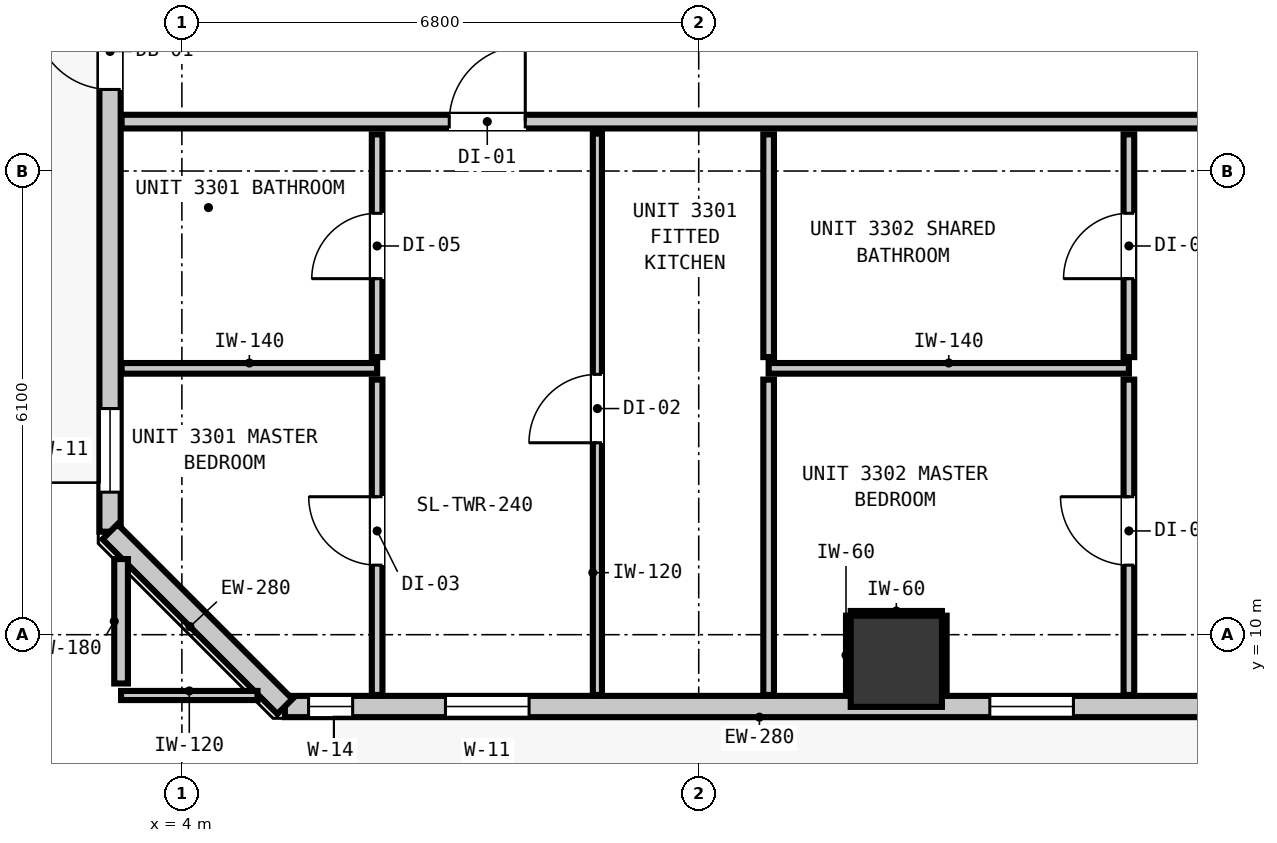
"""IFC4 building model, lengths in metres.
Left out: names, types, materials, properties, quantities, classifications, styles, units other than length and angle.
Written with IfcOpenShell. Run it as: python <this file> out.ifc"""

import sys

from ifc_helpers import new_model, si_unit, direction, frame, frame_2d, origin, origin_2d, place, context, subcontext, project, spatial, rectangle, extrude, element, fill, save


model = new_model("IFC4")
c1 = context("Model", 3, precision=1e-05, world=origin(), true_north=direction((0.0, 1.0)))
c2 = subcontext(c1, "Body", "Model", "MODEL_VIEW")
j1 = project(units=[si_unit("LENGTHUNIT", "METRE"), si_unit("PLANEANGLEUNIT", "RADIAN")], contexts=[c1])
p1 = place(None, origin())
s1 = spatial("IfcSite", under=j1, at=p1, CompositionType="ELEMENT")
p2 = place(p1, origin())
s2 = spatial("IfcBuilding", under=s1, at=p2, CompositionType="ELEMENT")
p3 = place(p2, frame((0.0, 0.0, 116.04)))
s3 = spatial("IfcBuildingStorey", under=s2, at=p3, CompositionType="ELEMENT", Elevation=116.04)
p4 = place(p3, frame((13.4, 9.65, 0.0), z_axis=(0.0, 0.0, 1.0), x_axis=(1.0, 0.0, 0.0)))
e1 = element("IfcColumn", 1, at=p4, inside=s3, PredefinedType="COLUMN", context=c2, shape_type="SweptSolid", body=[
    extrude(rectangle(XDim=1.2, YDim=1.2, at=origin_2d()), origin(), (0.0, 0.0, 1.0), 3.32),
])
p5 = place(p3, frame((3.055, 11.355, 0.0), z_axis=(0.0, 0.0, 1.0), x_axis=(0.0, 1.0, 0.0)))
e2 = element("IfcWall", 2, at=p5, inside=s3, PredefinedType="STANDARD", context=c2, shape_type="SweptSolid", body=[
    extrude(rectangle(XDim=32.29, YDim=0.28, at=frame_2d((16.145, 0.0))), origin(), (0.0, 0.0, 1.0), 3.08),
])
p6 = place(p5, frame((5.818, 0.0, 0.0)))
e3 = element("IfcOpeningElement", 3, at=p6, cuts=e2, PredefinedType="OPENING", context=c2, shape_type="SweptSolid", body=[
    extrude(rectangle(XDim=1.0, YDim=2.15, at=frame_2d((0.5, 1.075))), frame((0.0, 0.15, 0.0), z_axis=(0.0, -1.0, 0.0), x_axis=(1.0, 0.0, 0.0)), (0.0, 0.0, 1.0), 0.3),
])
p7 = place(p5, frame((0.52, 0.0, 0.85)))
e4 = element("IfcOpeningElement", 4, at=p7, cuts=e2, PredefinedType="OPENING", context=c2, shape_type="SweptSolid", body=[
    extrude(rectangle(XDim=1.1, YDim=2.05, at=frame_2d((0.55, 1.025))), frame((0.0, 0.15, 0.0), z_axis=(0.0, -1.0, 0.0), x_axis=(1.0, 0.0, 0.0)), (0.0, 0.0, 1.0), 0.3),
])
p8 = place(p5, frame((20.905, 0.0, 0.85)))
e5 = element("IfcOpeningElement", 5, at=p8, cuts=e2, PredefinedType="OPENING", context=c2, shape_type="SweptSolid", body=[
    extrude(rectangle(XDim=1.1, YDim=2.05, at=frame_2d((0.55, 1.025))), frame((0.0, 0.15, 0.0), z_axis=(0.0, -1.0, 0.0), x_axis=(1.0, 0.0, 0.0)), (0.0, 0.0, 1.0), 0.3),
])
p9 = place(p5, frame((12.735, 0.0, 0.85)))
e6 = element("IfcOpeningElement", 6, at=p9, cuts=e2, PredefinedType="OPENING", context=c2, shape_type="SweptSolid", body=[
    extrude(rectangle(XDim=1.1, YDim=2.05, at=frame_2d((0.55, 1.025))), frame((0.0, 0.15, 0.0), z_axis=(0.0, -1.0, 0.0), x_axis=(1.0, 0.0, 0.0)), (0.0, 0.0, 1.0), 0.3),
])
p10 = place(p5, frame((24.855, 0.0, 0.85)))
e7 = element("IfcOpeningElement", 7, at=p10, cuts=e2, PredefinedType="OPENING", context=c2, shape_type="SweptSolid", body=[
    extrude(rectangle(XDim=1.1, YDim=2.05, at=frame_2d((0.55, 1.025))), frame((0.0, 0.15, 0.0), z_axis=(0.0, -1.0, 0.0), x_axis=(1.0, 0.0, 0.0)), (0.0, 0.0, 1.0), 0.3),
])
p11 = place(p3, frame((40.445, 9.055, 0.0), z_axis=(0.0, 0.0, 1.0), x_axis=(-1.0, 0.0, 0.0)))
e8 = element("IfcWall", 8, at=p11, inside=s3, PredefinedType="STANDARD", context=c2, shape_type="SweptSolid", body=[
    extrude(rectangle(XDim=35.09, YDim=0.28, at=frame_2d((17.545, 0.0))), origin(), (0.0, 0.0, 1.0), 3.08),
])
p12 = place(p11, frame((5.114, 0.0, 0.0)))
e9 = element("IfcOpeningElement", 9, at=p12, cuts=e8, PredefinedType="OPENING", context=c2, shape_type="SweptSolid", body=[
    extrude(rectangle(XDim=1.0, YDim=2.15, at=frame_2d((0.5, 1.075))), frame((0.0, 0.15, 0.0), z_axis=(0.0, -1.0, 0.0), x_axis=(1.0, 0.0, 0.0)), (0.0, 0.0, 1.0), 0.3),
])
p13 = place(p11, frame((31.877, 0.0, 0.85)))
e10 = element("IfcOpeningElement", 10, at=p13, cuts=e8, PredefinedType="OPENING", context=c2, shape_type="SweptSolid", body=[
    extrude(rectangle(XDim=1.1, YDim=2.05, at=frame_2d((0.55, 1.025))), frame((0.0, 0.15, 0.0), z_axis=(0.0, -1.0, 0.0), x_axis=(1.0, 0.0, 0.0)), (0.0, 0.0, 1.0), 0.3),
])
p14 = place(p11, frame((34.198, 0.0, 0.85)))
e11 = element("IfcOpeningElement", 11, at=p14, cuts=e8, PredefinedType="OPENING", context=c2, shape_type="SweptSolid", body=[
    extrude(rectangle(XDim=0.58, YDim=1.5, at=frame_2d((0.29, 0.75))), frame((0.0, 0.15, 0.0), z_axis=(0.0, -1.0, 0.0), x_axis=(1.0, 0.0, 0.0)), (0.0, 0.0, 1.0), 0.3),
])
p15 = place(p11, frame((21.515, 0.0, 0.85)))
e12 = element("IfcOpeningElement", 12, at=p15, cuts=e8, PredefinedType="OPENING", context=c2, shape_type="SweptSolid", body=[
    extrude(rectangle(XDim=1.1, YDim=2.05, at=frame_2d((0.55, 1.025))), frame((0.0, 0.15, 0.0), z_axis=(0.0, -1.0, 0.0), x_axis=(1.0, 0.0, 0.0)), (0.0, 0.0, 1.0), 0.3),
])
p16 = place(p11, frame((24.715, 0.0, 0.85)))
e13 = element("IfcOpeningElement", 13, at=p16, cuts=e8, PredefinedType="OPENING", context=c2, shape_type="SweptSolid", body=[
    extrude(rectangle(XDim=1.1, YDim=2.05, at=frame_2d((0.55, 1.025))), frame((0.0, 0.15, 0.0), z_axis=(0.0, -1.0, 0.0), x_axis=(1.0, 0.0, 0.0)), (0.0, 0.0, 1.0), 0.3),
])
p17 = place(p11, frame((14.824, 0.0, 0.85)))
e14 = element("IfcOpeningElement", 14, at=p17, cuts=e8, PredefinedType="OPENING", context=c2, shape_type="SweptSolid", body=[
    extrude(rectangle(XDim=1.1, YDim=2.05, at=frame_2d((0.55, 1.025))), frame((0.0, 0.15, 0.0), z_axis=(0.0, -1.0, 0.0), x_axis=(1.0, 0.0, 0.0)), (0.0, 0.0, 1.0), 0.3),
])
p18 = place(p11, frame((6.682, 0.0, 0.85)))
e15 = element("IfcOpeningElement", 15, at=p18, cuts=e8, PredefinedType="OPENING", context=c2, shape_type="SweptSolid", body=[
    extrude(rectangle(XDim=1.1, YDim=2.05, at=frame_2d((0.55, 1.025))), frame((0.0, 0.15, 0.0), z_axis=(0.0, -1.0, 0.0), x_axis=(1.0, 0.0, 0.0)), (0.0, 0.0, 1.0), 0.3),
])
p19 = place(p11, frame((8.948, 0.0, 0.85)))
e16 = element("IfcOpeningElement", 16, at=p19, cuts=e8, PredefinedType="OPENING", context=c2, shape_type="SweptSolid", body=[
    extrude(rectangle(XDim=1.1, YDim=2.05, at=frame_2d((0.55, 1.025))), frame((0.0, 0.15, 0.0), z_axis=(0.0, -1.0, 0.0), x_axis=(1.0, 0.0, 0.0)), (0.0, 0.0, 1.0), 0.3),
])
p20 = place(p3, frame((5.355, 9.055, 0.0), z_axis=(0.0, 0.0, 1.0), x_axis=(-0.707106781187, 0.707106781187, 0.0)))
e17 = element("IfcWall", 17, at=p20, inside=s3, PredefinedType="STANDARD", context=c2, shape_type="SweptSolid", body=[
    extrude(rectangle(XDim=3.253, YDim=0.28, at=frame_2d((1.626, 0.0))), origin(), (0.0, 0.0, 1.0), 3.08),
])
p21 = place(p3, frame((3.207, 16.75, 0.0), z_axis=(0.0, 0.0, 1.0), x_axis=(1.0, 0.0, 0.0)))
e18 = element("IfcWall", 18, at=p21, inside=s3, PredefinedType="PARTITIONING", context=c2, shape_type="SweptSolid", body=[
    extrude(rectangle(XDim=39.386, YDim=0.18, at=frame_2d((19.693, 0.0))), origin(), (0.0, 0.0, 1.0), 3.08),
])
p22 = place(p21, frame((4.311, 0.0, 0.0)))
e19 = element("IfcOpeningElement", 19, at=p22, cuts=e18, PredefinedType="OPENING", context=c2, shape_type="SweptSolid", body=[
    extrude(rectangle(XDim=1.0, YDim=2.15, at=frame_2d((0.5, 1.075))), frame((0.0, 0.1, 0.0), z_axis=(0.0, -1.0, 0.0), x_axis=(1.0, 0.0, 0.0)), (0.0, 0.0, 1.0), 0.2),
])
p23 = place(p21, frame((15.834, 0.0, 0.0)))
e20 = element("IfcOpeningElement", 20, at=p23, cuts=e18, PredefinedType="OPENING", context=c2, shape_type="SweptSolid", body=[
    extrude(rectangle(XDim=1.0, YDim=2.15, at=frame_2d((0.5, 1.075))), frame((0.0, 0.1, 0.0), z_axis=(0.0, -1.0, 0.0), x_axis=(1.0, 0.0, 0.0)), (0.0, 0.0, 1.0), 0.2),
])
p24 = place(p21, frame((31.654, 0.0, 0.0)))
e21 = element("IfcOpeningElement", 21, at=p24, cuts=e18, PredefinedType="OPENING", context=c2, shape_type="SweptSolid", body=[
    extrude(rectangle(XDim=1.0, YDim=2.15, at=frame_2d((0.5, 1.075))), frame((0.0, 0.1, 0.0), z_axis=(0.0, -1.0, 0.0), x_axis=(1.0, 0.0, 0.0)), (0.0, 0.0, 1.0), 0.2),
])
p25 = place(p3, frame((3.207, 13.504, 0.0), z_axis=(0.0, 0.0, 1.0), x_axis=(1.0, 0.0, 0.0)))
e22 = element("IfcWall", 22, at=p25, inside=s3, PredefinedType="PARTITIONING", context=c2, shape_type="SweptSolid", body=[
    extrude(rectangle(XDim=3.362, YDim=0.14, at=frame_2d((1.681, 0.0))), origin(), (0.0, 0.0, 1.0), 3.08),
])
p26 = place(p3, frame((11.72, 13.504, 0.0), z_axis=(0.0, 0.0, 1.0), x_axis=(1.0, 0.0, 0.0)))
e23 = element("IfcWall", 23, at=p26, inside=s3, PredefinedType="PARTITIONING", context=c2, shape_type="SweptSolid", body=[
    extrude(rectangle(XDim=4.74, YDim=0.14, at=frame_2d((2.37, 0.0))), origin(), (0.0, 0.0, 1.0), 3.08),
])
p27 = place(p3, frame((3.2, 9.2, 0.0), z_axis=(0.0, 0.0, 1.0), x_axis=(1.0, 0.0, 0.0)))
e24 = element("IfcWall", 24, at=p27, inside=s3, PredefinedType="PARTITIONING", context=c2, shape_type="SweptSolid", body=[
    extrude(rectangle(XDim=1.795, YDim=0.12, at=frame_2d((0.897, 0.0))), origin(), (0.0, 0.0, 1.0), 3.08),
])
p28 = place(p3, frame((3.2, 9.358, 0.0), z_axis=(0.0, 0.0, 1.0), x_axis=(0.0, 1.0, 0.0)))
e25 = element("IfcWall", 25, at=p28, inside=s3, PredefinedType="PARTITIONING", context=c2, shape_type="SweptSolid", body=[
    extrude(rectangle(XDim=1.637, YDim=0.18, at=frame_2d((0.819, 0.0))), origin(), (0.0, 0.0, 1.0), 3.08),
])
p29 = place(p3, frame((6.569, 9.207, 0.0), z_axis=(0.0, 0.0, 1.0), x_axis=(0.0, 1.0, 0.0)))
e26 = element("IfcWall", 26, at=p29, inside=s3, PredefinedType="PARTITIONING", context=c2, shape_type="SweptSolid", body=[
    extrude(rectangle(XDim=4.149, YDim=0.14, at=frame_2d((2.074, 0.0))), origin(), (0.0, 0.0, 1.0), 3.08),
])
p30 = place(p29, frame((1.708, 0.0, 0.0)))
e27 = element("IfcOpeningElement", 27, at=p30, cuts=e26, PredefinedType="OPENING", context=c2, shape_type="SweptSolid", body=[
    extrude(rectangle(XDim=0.9, YDim=2.1, at=frame_2d((0.45, 1.05))), frame((0.0, 0.08, 0.0), z_axis=(0.0, -1.0, 0.0), x_axis=(1.0, 0.0, 0.0)), (0.0, 0.0, 1.0), 0.16),
])
p31 = place(p3, frame((6.569, 13.652, 0.0), z_axis=(0.0, 0.0, 1.0), x_axis=(0.0, 1.0, 0.0)))
e28 = element("IfcWall", 28, at=p31, inside=s3, PredefinedType="PARTITIONING", context=c2, shape_type="SweptSolid", body=[
    extrude(rectangle(XDim=2.93, YDim=0.14, at=frame_2d((1.465, 0.0))), origin(), (0.0, 0.0, 1.0), 3.08),
])
p32 = place(p31, frame((1.032, 0.0, 0.0)))
e29 = element("IfcOpeningElement", 29, at=p32, cuts=e28, PredefinedType="OPENING", context=c2, shape_type="SweptSolid", body=[
    extrude(rectangle(XDim=0.86, YDim=2.02, at=frame_2d((0.43, 1.01))), frame((0.0, 0.08, 0.0), z_axis=(0.0, -1.0, 0.0), x_axis=(1.0, 0.0, 0.0)), (0.0, 0.0, 1.0), 0.16),
])
p33 = place(p3, frame((11.72, 9.207, 0.0), z_axis=(0.0, 0.0, 1.0), x_axis=(0.0, 1.0, 0.0)))
e30 = element("IfcWall", 30, at=p33, inside=s3, PredefinedType="PARTITIONING", context=c2, shape_type="SweptSolid", body=[
    extrude(rectangle(XDim=4.149, YDim=0.14, at=frame_2d((2.074, 0.0))), origin(), (0.0, 0.0, 1.0), 3.08),
])
p34 = place(p3, frame((11.72, 13.652, 0.0), z_axis=(0.0, 0.0, 1.0), x_axis=(0.0, 1.0, 0.0)))
e31 = element("IfcWall", 31, at=p34, inside=s3, PredefinedType="PARTITIONING", context=c2, shape_type="SweptSolid", body=[
    extrude(rectangle(XDim=2.93, YDim=0.14, at=frame_2d((1.465, 0.0))), origin(), (0.0, 0.0, 1.0), 3.08),
])
p35 = place(p3, frame((16.46, 9.207, 0.0), z_axis=(0.0, 0.0, 1.0), x_axis=(0.0, 1.0, 0.0)))
e32 = element("IfcWall", 32, at=p35, inside=s3, PredefinedType="PARTITIONING", context=c2, shape_type="SweptSolid", body=[
    extrude(rectangle(XDim=4.149, YDim=0.14, at=frame_2d((2.074, 0.0))), origin(), (0.0, 0.0, 1.0), 3.08),
])
p36 = place(p35, frame((1.708, 0.0, 0.0)))
e33 = element("IfcOpeningElement", 33, at=p36, cuts=e32, PredefinedType="OPENING", context=c2, shape_type="SweptSolid", body=[
    extrude(rectangle(XDim=0.9, YDim=2.1, at=frame_2d((0.45, 1.05))), frame((0.0, 0.08, 0.0), z_axis=(0.0, -1.0, 0.0), x_axis=(1.0, 0.0, 0.0)), (0.0, 0.0, 1.0), 0.16),
])
p37 = place(p3, frame((16.46, 13.652, 0.0), z_axis=(0.0, 0.0, 1.0), x_axis=(0.0, 1.0, 0.0)))
e34 = element("IfcWall", 34, at=p37, inside=s3, PredefinedType="PARTITIONING", context=c2, shape_type="SweptSolid", body=[
    extrude(rectangle(XDim=2.93, YDim=0.14, at=frame_2d((1.465, 0.0))), origin(), (0.0, 0.0, 1.0), 3.08),
])
p38 = place(p37, frame((1.032, 0.0, 0.0)))
e35 = element("IfcOpeningElement", 35, at=p38, cuts=e34, PredefinedType="OPENING", context=c2, shape_type="SweptSolid", body=[
    extrude(rectangle(XDim=0.86, YDim=2.02, at=frame_2d((0.43, 1.01))), frame((0.0, 0.08, 0.0), z_axis=(0.0, -1.0, 0.0), x_axis=(1.0, 0.0, 0.0)), (0.0, 0.0, 1.0), 0.16),
])
p39 = place(p3, frame((9.467, 9.207, 0.0), z_axis=(0.0, 0.0, 1.0), x_axis=(0.0, 1.0, 0.0)))
e36 = element("IfcWall", 36, at=p39, inside=s3, PredefinedType="PARTITIONING", context=c2, shape_type="SweptSolid", body=[
    extrude(rectangle(XDim=7.385, YDim=0.12, at=frame_2d((3.692, 0.0))), origin(), (0.0, 0.0, 1.0), 3.08),
])
p40 = place(p39, frame((3.318, 0.0, 0.0)))
e37 = element("IfcOpeningElement", 37, at=p40, cuts=e36, PredefinedType="OPENING", context=c2, shape_type="SweptSolid", body=[
    extrude(rectangle(XDim=0.9, YDim=2.1, at=frame_2d((0.45, 1.05))), frame((0.0, 0.07, 0.0), z_axis=(0.0, -1.0, 0.0), x_axis=(1.0, 0.0, 0.0)), (0.0, 0.0, 1.0), 0.14),
])
p41 = place(p3, frame((12.8, 10.282, 0.0), z_axis=(0.0, 0.0, 1.0), x_axis=(1.0, 0.0, 0.0)))
e38 = element("IfcWall", 38, at=p41, inside=s3, PredefinedType="PARTITIONING", context=c2, shape_type="SweptSolid", body=[
    extrude(rectangle(XDim=1.2, YDim=0.06, at=frame_2d((0.6, 0.0))), origin(), (0.0, 0.0, 1.0), 1.45),
])
for number, where, z_axis, x_axis in (
    (39, (12.768, 9.21, 0.0), (0.0, 0.0, 1.0), (0.0, 1.0, 0.0)),
    (40, (14.032, 9.21, 0.0), (0.0, 0.0, 1.0), (0.0, 1.0, 0.0)),
):
    element("IfcWall", number, at=place(p3, frame(where, z_axis=z_axis, x_axis=x_axis)), inside=s3, PredefinedType="PARTITIONING", context=c2, shape_type="SweptSolid", body=[
        extrude(rectangle(XDim=1.04, YDim=0.06, at=frame_2d((0.52, 0.0))), origin(), (0.0, 0.0, 1.0), 1.45),
    ])
p42 = place(p6, origin())
e41 = element("IfcDoor", 41, at=p42, inside=s3, OperationType="SINGLE_SWING_RIGHT", PredefinedType="DOOR", context=c2, shape_type="SweptSolid", body=[
    extrude(rectangle(XDim=1.0, YDim=2.15, at=frame_2d((0.5, 1.075))), frame((0.0, 0.025, 0.0), z_axis=(0.0, -1.0, 0.0), x_axis=(1.0, 0.0, 0.0)), (0.0, 0.0, 1.0), 0.05),
])
fill(e3, e41)
p43 = place(p7, origin())
e42 = element("IfcWindow", 42, at=p43, inside=s3, PartitioningType="SINGLE_PANEL", PredefinedType="WINDOW", context=c2, shape_type="SweptSolid", body=[
    extrude(rectangle(XDim=1.1, YDim=2.05, at=frame_2d((0.55, 1.025))), frame((0.0, 0.03, 0.0), z_axis=(0.0, -1.0, 0.0), x_axis=(1.0, 0.0, 0.0)), (0.0, 0.0, 1.0), 0.06),
])
fill(e4, e42)
p44 = place(p13, origin())
e43 = element("IfcWindow", 43, at=p44, inside=s3, PartitioningType="SINGLE_PANEL", PredefinedType="WINDOW", context=c2, shape_type="SweptSolid", body=[
    extrude(rectangle(XDim=1.1, YDim=2.05, at=frame_2d((0.55, 1.025))), frame((0.0, 0.03, 0.0), z_axis=(0.0, -1.0, 0.0), x_axis=(1.0, 0.0, 0.0)), (0.0, 0.0, 1.0), 0.06),
])
fill(e10, e43)
p45 = place(p14, origin())
e44 = element("IfcWindow", 44, at=p45, inside=s3, PartitioningType="SINGLE_PANEL", PredefinedType="WINDOW", context=c2, shape_type="SweptSolid", body=[
    extrude(rectangle(XDim=0.58, YDim=1.5, at=frame_2d((0.29, 0.75))), frame((0.0, 0.03, 0.0), z_axis=(0.0, -1.0, 0.0), x_axis=(1.0, 0.0, 0.0)), (0.0, 0.0, 1.0), 0.06),
])
fill(e11, e44)
p46 = place(p16, origin())
e45 = element("IfcWindow", 45, at=p46, inside=s3, PartitioningType="SINGLE_PANEL", PredefinedType="WINDOW", context=c2, shape_type="SweptSolid", body=[
    extrude(rectangle(XDim=1.1, YDim=2.05, at=frame_2d((0.55, 1.025))), frame((0.0, 0.03, 0.0), z_axis=(0.0, -1.0, 0.0), x_axis=(1.0, 0.0, 0.0)), (0.0, 0.0, 1.0), 0.06),
])
fill(e13, e45)
p47 = place(p22, origin())
e46 = element("IfcDoor", 46, at=p47, inside=s3, OperationType="SINGLE_SWING_RIGHT", PredefinedType="DOOR", context=c2, shape_type="SweptSolid", body=[
    extrude(rectangle(XDim=1.0, YDim=2.15, at=frame_2d((0.5, 1.075))), frame((0.0, 0.025, 0.0), z_axis=(0.0, -1.0, 0.0), x_axis=(1.0, 0.0, 0.0)), (0.0, 0.0, 1.0), 0.05),
])
fill(e19, e46)
p48 = place(p32, origin())
e47 = element("IfcDoor", 47, at=p48, inside=s3, OperationType="SINGLE_SWING_LEFT", PredefinedType="DOOR", context=c2, shape_type="SweptSolid", body=[
    extrude(rectangle(XDim=0.86, YDim=2.02, at=frame_2d((0.43, 1.01))), frame((0.0, 0.025, 0.0), z_axis=(0.0, -1.0, 0.0), x_axis=(1.0, 0.0, 0.0)), (0.0, 0.0, 1.0), 0.05),
])
fill(e29, e47)
p49 = place(p30, origin())
e48 = element("IfcDoor", 48, at=p49, inside=s3, OperationType="SINGLE_SWING_RIGHT", PredefinedType="DOOR", context=c2, shape_type="SweptSolid", body=[
    extrude(rectangle(XDim=0.9, YDim=2.1, at=frame_2d((0.45, 1.05))), frame((0.0, 0.025, 0.0), z_axis=(0.0, -1.0, 0.0), x_axis=(1.0, 0.0, 0.0)), (0.0, 0.0, 1.0), 0.05),
])
fill(e27, e48)
p50 = place(p40, origin())
e49 = element("IfcDoor", 49, at=p50, inside=s3, OperationType="SINGLE_SWING_LEFT", PredefinedType="DOOR", context=c2, shape_type="SweptSolid", body=[
    extrude(rectangle(XDim=0.9, YDim=2.1, at=frame_2d((0.45, 1.05))), frame((0.0, 0.025, 0.0), z_axis=(0.0, -1.0, 0.0), x_axis=(1.0, 0.0, 0.0)), (0.0, 0.0, 1.0), 0.05),
])
fill(e37, e49)
p51 = place(p38, origin())
e50 = element("IfcDoor", 50, at=p51, inside=s3, OperationType="SINGLE_SWING_LEFT", PredefinedType="DOOR", context=c2, shape_type="SweptSolid", body=[
    extrude(rectangle(XDim=0.86, YDim=2.02, at=frame_2d((0.43, 1.01))), frame((0.0, 0.025, 0.0), z_axis=(0.0, -1.0, 0.0), x_axis=(1.0, 0.0, 0.0)), (0.0, 0.0, 1.0), 0.05),
])
fill(e35, e50)
p52 = place(p36, origin())
e51 = element("IfcDoor", 51, at=p52, inside=s3, OperationType="SINGLE_SWING_RIGHT", PredefinedType="DOOR", context=c2, shape_type="SweptSolid", body=[
    extrude(rectangle(XDim=0.9, YDim=2.1, at=frame_2d((0.45, 1.05))), frame((0.0, 0.025, 0.0), z_axis=(0.0, -1.0, 0.0), x_axis=(1.0, 0.0, 0.0)), (0.0, 0.0, 1.0), 0.05),
])
fill(e33, e51)
save(model, sys.argv[1])
